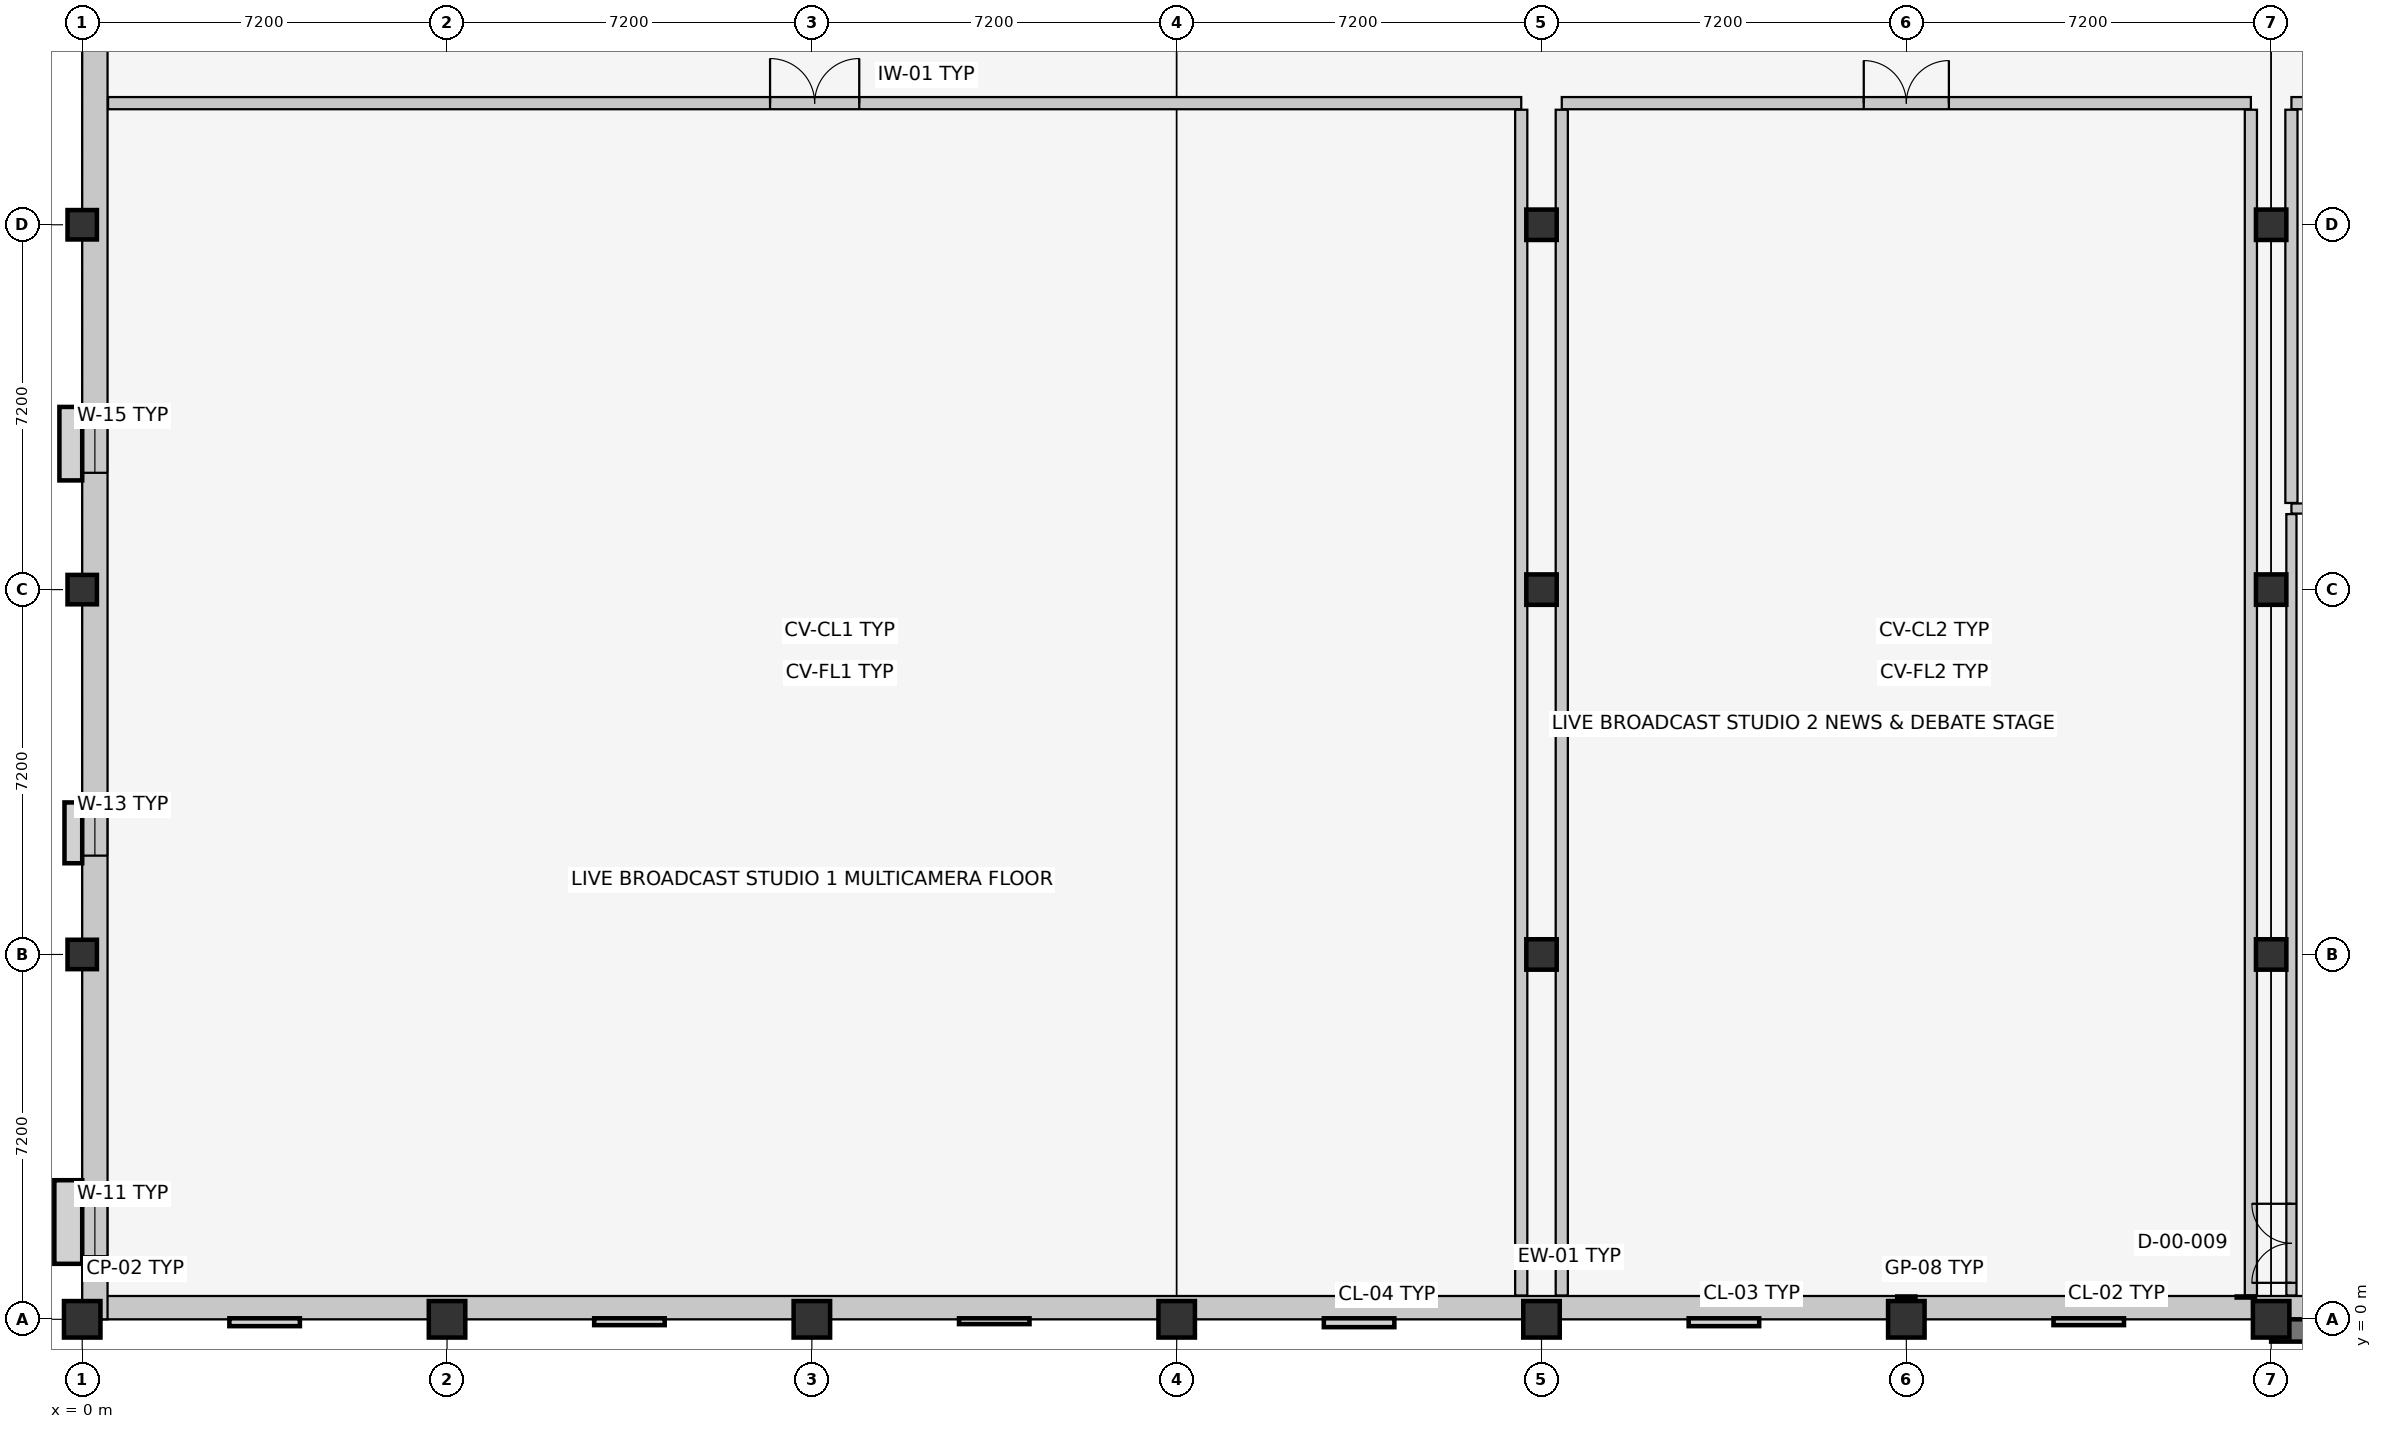
"""IFC4 building model, lengths in metres.
Left out: names, types, materials, properties, quantities, classifications, styles, units other than length and angle.
Written with IfcOpenShell. Run it as: python <this file> out.ifc"""

import sys

from ifc_helpers import new_model, si_unit, direction, frame, frame_2d, origin, origin_with_axes, origin_2d, place, context, subcontext, project, spatial, rectangle, extrude, element, fill, save


model = new_model("IFC4")
c1 = context("Model", 3, precision=1e-05, world=origin(), true_north=direction((0.0, 1.0)))
c2 = subcontext(c1, "Body", "Model", "MODEL_VIEW")
j1 = project(units=[si_unit("LENGTHUNIT", "METRE"), si_unit("PLANEANGLEUNIT", "RADIAN")], contexts=[c1])
p1 = place(None, origin())
s1 = spatial("IfcSite", under=j1, at=p1, CompositionType="ELEMENT")
p2 = place(p1, origin())
s2 = spatial("IfcBuilding", under=s1, at=p2, CompositionType="ELEMENT")
p3 = place(p2, origin())
s3 = spatial("IfcBuildingStorey", under=s2, at=p3, CompositionType="ELEMENT", Elevation=0.0)
p4 = place(p3, origin_with_axes())
e1 = element("IfcColumn", 1, at=p4, inside=s3, PredefinedType="COLUMN", context=c2, shape_type="SweptSolid", body=[
    extrude(rectangle(XDim=0.72, YDim=0.72, at=origin_2d()), origin(), (0.0, 0.0, 1.0), 5.4),
])
for number, where, z_axis, x_axis in (
    (2, (0.0, 7.2, 0.0), (0.0, 0.0, 1.0), (1.0, 0.0, 0.0)),
    (3, (0.0, 14.4, 0.0), (0.0, 0.0, 1.0), (1.0, 0.0, 0.0)),
    (4, (0.0, 21.6, 0.0), (0.0, 0.0, 1.0), (1.0, 0.0, 0.0)),
):
    element("IfcColumn", number, at=place(p3, frame(where, z_axis=z_axis, x_axis=x_axis)), inside=s3, PredefinedType="COLUMN", context=c2, shape_type="SweptSolid", body=[
        extrude(rectangle(XDim=0.58, YDim=0.58, at=origin_2d()), origin(), (0.0, 0.0, 1.0), 5.4),
    ])
for number, where, z_axis, x_axis in (
    (5, (7.2, 0.0, 0.0), (0.0, 0.0, 1.0), (1.0, 0.0, 0.0)),
    (6, (14.4, 0.0, 0.0), (0.0, 0.0, 1.0), (1.0, 0.0, 0.0)),
    (7, (21.6, 0.0, 0.0), (0.0, 0.0, 1.0), (1.0, 0.0, 0.0)),
    (8, (28.8, 0.0, 0.0), (0.0, 0.0, 1.0), (1.0, 0.0, 0.0)),
):
    element("IfcColumn", number, at=place(p3, frame(where, z_axis=z_axis, x_axis=x_axis)), inside=s3, PredefinedType="COLUMN", context=c2, shape_type="SweptSolid", body=[
        extrude(rectangle(XDim=0.72, YDim=0.72, at=origin_2d()), origin(), (0.0, 0.0, 1.0), 5.4),
    ])
for number, where, z_axis, x_axis in (
    (9, (28.8, 7.2, 0.0), (0.0, 0.0, 1.0), (1.0, 0.0, 0.0)),
    (10, (28.8, 14.4, 0.0), (0.0, 0.0, 1.0), (1.0, 0.0, 0.0)),
    (11, (28.8, 21.6, 0.0), (0.0, 0.0, 1.0), (1.0, 0.0, 0.0)),
):
    element("IfcColumn", number, at=place(p3, frame(where, z_axis=z_axis, x_axis=x_axis)), inside=s3, PredefinedType="COLUMN", context=c2, shape_type="SweptSolid", body=[
        extrude(rectangle(XDim=0.6, YDim=0.6, at=origin_2d()), origin(), (0.0, 0.0, 1.0), 5.4),
    ])
for number, where, z_axis, x_axis in (
    (12, (36.0, 0.0, 0.0), (0.0, 0.0, 1.0), (1.0, 0.0, 0.0)),
    (13, (43.2, 0.0, 0.0), (0.0, 0.0, 1.0), (1.0, 0.0, 0.0)),
):
    element("IfcColumn", number, at=place(p3, frame(where, z_axis=z_axis, x_axis=x_axis)), inside=s3, PredefinedType="COLUMN", context=c2, shape_type="SweptSolid", body=[
        extrude(rectangle(XDim=0.72, YDim=0.72, at=origin_2d()), origin(), (0.0, 0.0, 1.0), 5.4),
    ])
for number, where, z_axis, x_axis in (
    (14, (43.2, 7.2, 0.0), (0.0, 0.0, 1.0), (1.0, 0.0, 0.0)),
    (15, (43.2, 14.4, 0.0), (0.0, 0.0, 1.0), (1.0, 0.0, 0.0)),
    (16, (43.2, 21.6, 0.0), (0.0, 0.0, 1.0), (1.0, 0.0, 0.0)),
):
    element("IfcColumn", number, at=place(p3, frame(where, z_axis=z_axis, x_axis=x_axis)), inside=s3, PredefinedType="COLUMN", context=c2, shape_type="SweptSolid", body=[
        extrude(rectangle(XDim=0.6, YDim=0.6, at=origin_2d()), origin(), (0.0, 0.0, 1.0), 5.4),
    ])
p5 = place(p3, frame((57.6, 0.23, 0.0), z_axis=(0.0, 0.0, 1.0), x_axis=(-1.0, 0.0, 0.0)))
e17 = element("IfcWall", 17, at=p5, inside=s3, PredefinedType="SOLIDWALL", context=c2, shape_type="SweptSolid", body=[
    extrude(rectangle(XDim=57.6, YDim=0.46, at=frame_2d((28.8, 0.0))), origin(), (0.0, 0.0, 1.0), 5.4),
])
p6 = place(p5, frame((8.7, 0.0, 0.0)))
e18 = element("IfcOpeningElement", 18, at=p6, cuts=e17, PredefinedType="OPENING", context=c2, shape_type="SweptSolid", body=[
    extrude(rectangle(XDim=4.2, YDim=4.8, at=frame_2d((2.1, 2.4))), frame((0.0, 0.242, 0.0), z_axis=(0.0, -1.0, 0.0), x_axis=(1.0, 0.0, 0.0)), (0.0, 0.0, 1.0), 0.484),
])
p7 = place(p3, frame((0.25, 0.0, 0.0), z_axis=(0.0, 0.0, 1.0), x_axis=(0.0, 1.0, 0.0)))
e19 = element("IfcWall", 19, at=p7, inside=s3, PredefinedType="SOLIDWALL", context=c2, shape_type="SweptSolid", body=[
    extrude(rectangle(XDim=38.4, YDim=0.5, at=frame_2d((19.2, 0.0))), origin(), (0.0, 0.0, 1.0), 4.255),
])
p8 = place(p7, frame((25.4, 0.0, 0.0)))
e20 = element("IfcOpeningElement", 20, at=p8, cuts=e19, PredefinedType="OPENING", context=c2, shape_type="SweptSolid", body=[
    extrude(rectangle(XDim=2.0, YDim=2.35, at=frame_2d((1.0, 1.175))), frame((0.0, 0.262, 0.0), z_axis=(0.0, -1.0, 0.0), x_axis=(1.0, 0.0, 0.0)), (0.0, 0.0, 1.0), 0.524),
])
p9 = place(p7, frame((1.245, 0.0, 0.9)))
e21 = element("IfcOpeningElement", 21, at=p9, cuts=e19, PredefinedType="OPENING", context=c2, shape_type="SweptSolid", body=[
    extrude(rectangle(XDim=1.35, YDim=1.45, at=frame_2d((0.675, 0.725))), frame((0.0, 0.262, 0.0), z_axis=(0.0, -1.0, 0.0), x_axis=(1.0, 0.0, 0.0)), (0.0, 0.0, 1.0), 0.524),
])
p10 = place(p7, frame((9.15, 0.0, 0.9)))
e22 = element("IfcOpeningElement", 22, at=p10, cuts=e19, PredefinedType="OPENING", context=c2, shape_type="SweptSolid", body=[
    extrude(rectangle(XDim=0.9, YDim=1.6, at=frame_2d((0.45, 0.8))), frame((0.0, 0.262, 0.0), z_axis=(0.0, -1.0, 0.0), x_axis=(1.0, 0.0, 0.0)), (0.0, 0.0, 1.0), 0.524),
])
p11 = place(p7, frame((16.705, 0.0, 0.9)))
e23 = element("IfcOpeningElement", 23, at=p11, cuts=e19, PredefinedType="OPENING", context=c2, shape_type="SweptSolid", body=[
    extrude(rectangle(XDim=1.15, YDim=1.6, at=frame_2d((0.575, 0.8))), frame((0.0, 0.262, 0.0), z_axis=(0.0, -1.0, 0.0), x_axis=(1.0, 0.0, 0.0)), (0.0, 0.0, 1.0), 0.524),
])
p12 = place(p7, frame((32.14, 0.0, 0.9)))
e24 = element("IfcOpeningElement", 24, at=p12, cuts=e19, PredefinedType="OPENING", context=c2, shape_type="SweptSolid", body=[
    extrude(rectangle(XDim=1.0, YDim=1.75, at=frame_2d((0.5, 0.875))), frame((0.0, 0.262, 0.0), z_axis=(0.0, -1.0, 0.0), x_axis=(1.0, 0.0, 0.0)), (0.0, 0.0, 1.0), 0.524),
])
p13 = place(p7, frame((35.92, 0.0, 0.9)))
e25 = element("IfcOpeningElement", 25, at=p13, cuts=e19, PredefinedType="OPENING", context=c2, shape_type="SweptSolid", body=[
    extrude(rectangle(XDim=1.12, YDim=1.75, at=frame_2d((0.56, 0.875))), frame((0.0, 0.262, 0.0), z_axis=(0.0, -1.0, 0.0), x_axis=(1.0, 0.0, 0.0)), (0.0, 0.0, 1.0), 0.524),
])
p14 = place(p3, frame((43.2, -0.22, -0.8), z_axis=(0.0, 0.0, 1.0), x_axis=(1.0, 0.0, 0.0)))
e26 = element("IfcWall", 26, at=p14, inside=s3, PredefinedType="USERDEFINED", context=c2, shape_type="SweptSolid", body=[
    extrude(rectangle(XDim=14.2, YDim=0.44, at=frame_2d((7.1, 0.0))), origin(), (0.0, 0.0, 1.0), 1.3),
])
p15 = place(p3, frame((0.51, 24.0, 0.0), z_axis=(0.0, 0.0, 1.0), x_axis=(1.0, 0.0, 0.0)))
e27 = element("IfcWall", 27, at=p15, inside=s3, PredefinedType="PARTITIONING", context=c2, shape_type="SweptSolid", body=[
    extrude(rectangle(XDim=27.89, YDim=0.24, at=frame_2d((13.945, 0.0))), origin(), (0.0, 0.0, 1.0), 5.15),
])
p16 = place(p15, frame((13.065, 0.0, 0.0)))
e28 = element("IfcOpeningElement", 28, at=p16, cuts=e27, PredefinedType="OPENING", context=c2, shape_type="SweptSolid", body=[
    extrude(rectangle(XDim=1.76, YDim=2.3, at=frame_2d((0.88, 1.15))), frame((0.0, 0.132, 0.0), z_axis=(0.0, -1.0, 0.0), x_axis=(1.0, 0.0, 0.0)), (0.0, 0.0, 1.0), 0.264),
])
p17 = place(p3, frame((28.4, 0.47, 0.0), z_axis=(0.0, 0.0, 1.0), x_axis=(0.0, 1.0, 0.0)))
e29 = element("IfcWall", 29, at=p17, inside=s3, PredefinedType="PARTITIONING", context=c2, shape_type="SweptSolid", body=[
    extrude(rectangle(XDim=23.4, YDim=0.24, at=frame_2d((11.7, 0.0))), origin(), (0.0, 0.0, 1.0), 5.15),
])
p18 = place(p3, frame((29.2, 24.0, 0.0), z_axis=(0.0, 0.0, 1.0), x_axis=(1.0, 0.0, 0.0)))
e30 = element("IfcWall", 30, at=p18, inside=s3, PredefinedType="PARTITIONING", context=c2, shape_type="SweptSolid", body=[
    extrude(rectangle(XDim=13.6, YDim=0.24, at=frame_2d((6.8, 0.0))), origin(), (0.0, 0.0, 1.0), 5.15),
])
p19 = place(p18, frame((5.96, 0.0, 0.0)))
e31 = element("IfcOpeningElement", 31, at=p19, cuts=e30, PredefinedType="OPENING", context=c2, shape_type="SweptSolid", body=[
    extrude(rectangle(XDim=1.68, YDim=2.3, at=frame_2d((0.84, 1.15))), frame((0.0, 0.132, 0.0), z_axis=(0.0, -1.0, 0.0), x_axis=(1.0, 0.0, 0.0)), (0.0, 0.0, 1.0), 0.264),
])
for number, where, z_axis, x_axis in (
    (32, (29.2, 0.47, 0.0), (0.0, 0.0, 1.0), (0.0, 1.0, 0.0)),
    (33, (42.8, 0.47, 0.0), (0.0, 0.0, 1.0), (0.0, 1.0, 0.0)),
):
    element("IfcWall", number, at=place(p3, frame(where, z_axis=z_axis, x_axis=x_axis)), inside=s3, PredefinedType="PARTITIONING", context=c2, shape_type="SweptSolid", body=[
        extrude(rectangle(XDim=23.4, YDim=0.24, at=frame_2d((11.7, 0.0))), origin(), (0.0, 0.0, 1.0), 5.15),
    ])
p20 = place(p3, frame((43.6, 16.0, 0.0), z_axis=(0.0, 0.0, 1.0), x_axis=(1.0, 0.0, 0.0)))
e34 = element("IfcWall", 34, at=p20, inside=s3, PredefinedType="PARTITIONING", context=c2, shape_type="SweptSolid", body=[
    extrude(rectangle(XDim=13.49, YDim=0.2, at=frame_2d((6.745, 0.0))), origin(), (0.0, 0.0, 1.0), 5.15),
])
p21 = place(p3, frame((43.6, 0.47, 0.0), z_axis=(0.0, 0.0, 1.0), x_axis=(0.0, 1.0, 0.0)))
e35 = element("IfcWall", 35, at=p21, inside=s3, PredefinedType="PARTITIONING", context=c2, shape_type="SweptSolid", body=[
    extrude(rectangle(XDim=15.42, YDim=0.2, at=frame_2d((7.71, 0.0))), origin(), (0.0, 0.0, 1.0), 5.15),
])
p22 = place(p21, frame((0.25, 0.0, 0.0)))
e36 = element("IfcOpeningElement", 36, at=p22, cuts=e35, PredefinedType="OPENING", context=c2, shape_type="SweptSolid", body=[
    extrude(rectangle(XDim=1.56, YDim=2.25, at=frame_2d((0.78, 1.125))), frame((0.0, 0.112, 0.0), z_axis=(0.0, -1.0, 0.0), x_axis=(1.0, 0.0, 0.0)), (0.0, 0.0, 1.0), 0.224),
])
p23 = place(p3, frame((43.6, 24.0, 0.0), z_axis=(0.0, 0.0, 1.0), x_axis=(1.0, 0.0, 0.0)))
e37 = element("IfcWall", 37, at=p23, inside=s3, PredefinedType="PARTITIONING", context=c2, shape_type="SweptSolid", body=[
    extrude(rectangle(XDim=13.49, YDim=0.24, at=frame_2d((6.745, 0.0))), origin(), (0.0, 0.0, 1.0), 5.15),
])
p24 = place(p23, frame((5.865, 0.0, 0.0)))
e38 = element("IfcOpeningElement", 38, at=p24, cuts=e37, PredefinedType="OPENING", context=c2, shape_type="SweptSolid", body=[
    extrude(rectangle(XDim=1.76, YDim=2.3, at=frame_2d((0.88, 1.15))), frame((0.0, 0.132, 0.0), z_axis=(0.0, -1.0, 0.0), x_axis=(1.0, 0.0, 0.0)), (0.0, 0.0, 1.0), 0.264),
])
p25 = place(p3, frame((43.6, 16.11, 0.0), z_axis=(0.0, 0.0, 1.0), x_axis=(0.0, 1.0, 0.0)))
e39 = element("IfcWall", 39, at=p25, inside=s3, PredefinedType="PARTITIONING", context=c2, shape_type="SweptSolid", body=[
    extrude(rectangle(XDim=7.76, YDim=0.24, at=frame_2d((3.88, 0.0))), origin(), (0.0, 0.0, 1.0), 5.15),
])
p26 = place(p9, origin())
e40 = element("IfcWindow", 40, at=p26, inside=s3, PartitioningType="SINGLE_PANEL", PredefinedType="WINDOW", context=c2, shape_type="SweptSolid", body=[
    extrude(rectangle(XDim=1.35, YDim=1.45, at=frame_2d((0.675, 0.725))), frame((0.0, 0.03, 0.0), z_axis=(0.0, -1.0, 0.0), x_axis=(1.0, 0.0, 0.0)), (0.0, 0.0, 1.0), 0.06),
])
fill(e21, e40)
p27 = place(p10, origin())
e41 = element("IfcWindow", 41, at=p27, inside=s3, PartitioningType="SINGLE_PANEL", PredefinedType="WINDOW", context=c2, shape_type="SweptSolid", body=[
    extrude(rectangle(XDim=0.9, YDim=1.6, at=frame_2d((0.45, 0.8))), frame((0.0, 0.03, 0.0), z_axis=(0.0, -1.0, 0.0), x_axis=(1.0, 0.0, 0.0)), (0.0, 0.0, 1.0), 0.06),
])
fill(e22, e41)
p28 = place(p11, origin())
e42 = element("IfcWindow", 42, at=p28, inside=s3, PartitioningType="SINGLE_PANEL", PredefinedType="WINDOW", context=c2, shape_type="SweptSolid", body=[
    extrude(rectangle(XDim=1.15, YDim=1.6, at=frame_2d((0.575, 0.8))), frame((0.0, 0.03, 0.0), z_axis=(0.0, -1.0, 0.0), x_axis=(1.0, 0.0, 0.0)), (0.0, 0.0, 1.0), 0.06),
])
fill(e23, e42)
p29 = place(p16, origin())
e43 = element("IfcDoor", 43, at=p29, inside=s3, OperationType="DOUBLE_DOOR_SINGLE_SWING", PredefinedType="DOOR", context=c2, shape_type="SweptSolid", body=[
    extrude(rectangle(XDim=1.76, YDim=2.3, at=frame_2d((0.88, 1.15))), frame((0.0, 0.025, 0.0), z_axis=(0.0, -1.0, 0.0), x_axis=(1.0, 0.0, 0.0)), (0.0, 0.0, 1.0), 0.05),
])
fill(e28, e43)
p30 = place(p19, origin())
e44 = element("IfcDoor", 44, at=p30, inside=s3, OperationType="DOUBLE_DOOR_SINGLE_SWING", PredefinedType="DOOR", context=c2, shape_type="SweptSolid", body=[
    extrude(rectangle(XDim=1.68, YDim=2.3, at=frame_2d((0.84, 1.15))), frame((0.0, 0.025, 0.0), z_axis=(0.0, -1.0, 0.0), x_axis=(1.0, 0.0, 0.0)), (0.0, 0.0, 1.0), 0.05),
])
fill(e31, e44)
p31 = place(p22, origin())
e45 = element("IfcDoor", 45, at=p31, inside=s3, OperationType="DOUBLE_DOOR_SINGLE_SWING", PredefinedType="DOOR", context=c2, shape_type="SweptSolid", body=[
    extrude(rectangle(XDim=1.56, YDim=2.25, at=frame_2d((0.78, 1.125))), frame((0.0, 0.025, 0.0), z_axis=(0.0, -1.0, 0.0), x_axis=(1.0, 0.0, 0.0)), (0.0, 0.0, 1.0), 0.05),
])
fill(e36, e45)
save(model, sys.argv[1])
